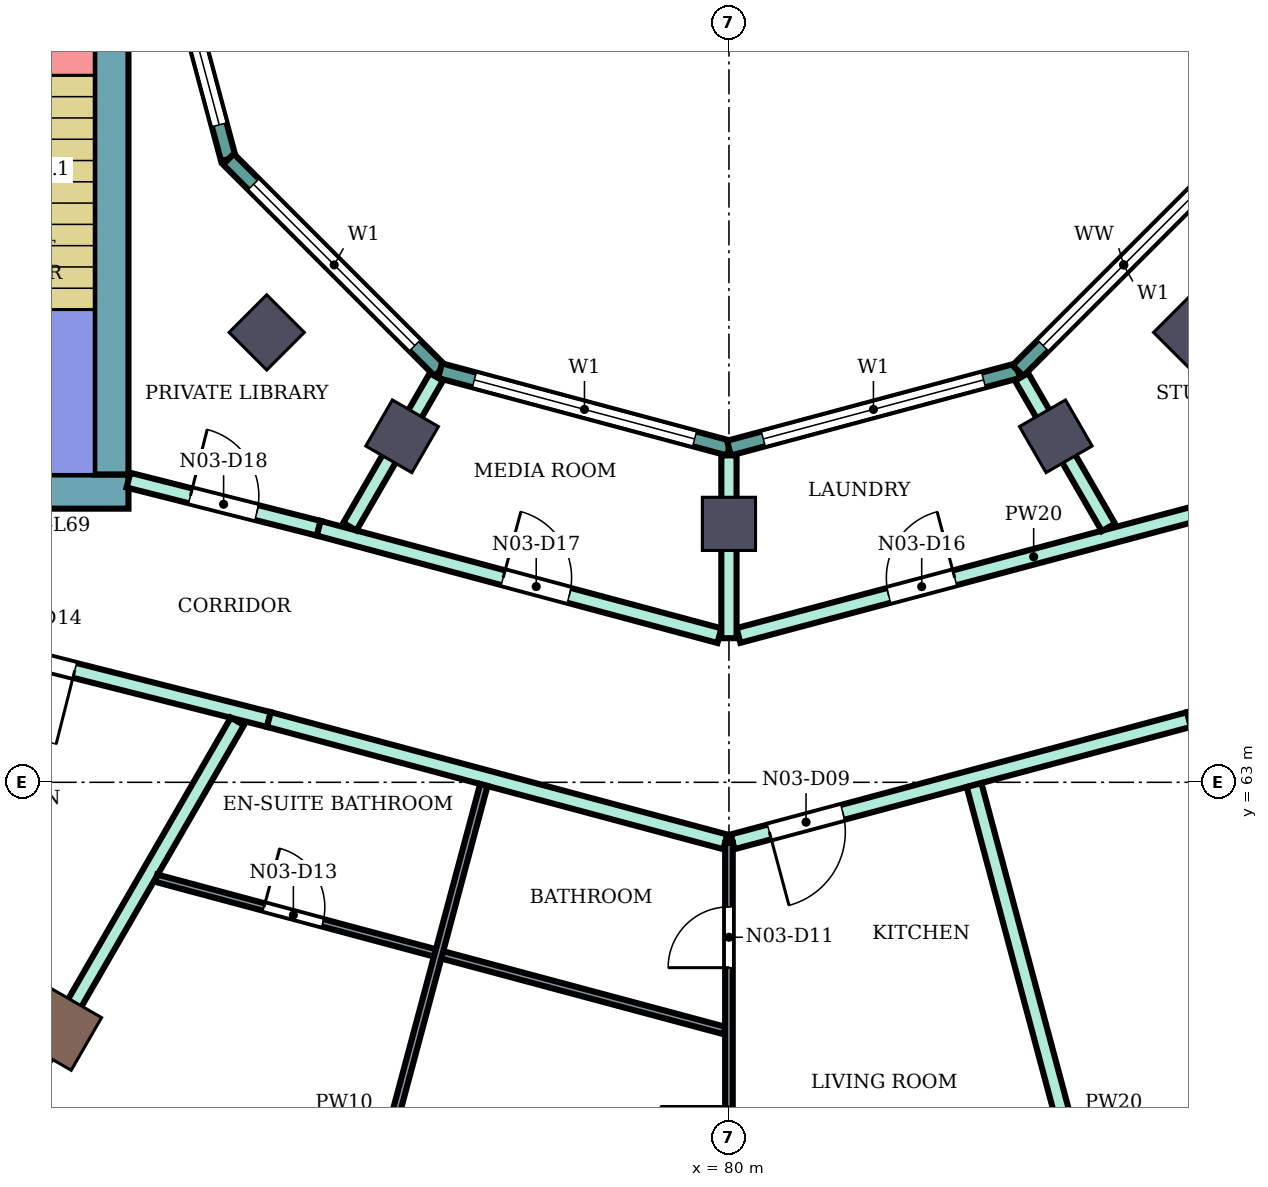
"""IFC4 building model, lengths in metres.
Left out: names, types, materials, properties, quantities, classifications, styles, units other than length and angle.
Written with IfcOpenShell. Run it as: python <this file> out.ifc"""

import sys

from ifc_helpers import new_model, si_unit, direction, frame, frame_2d, origin, origin_2d, place, context, subcontext, project, spatial, rectangle, extrude, element, fill, save


model = new_model("IFC4")
c1 = context("Model", 3, precision=1e-05, world=origin(), true_north=direction((0.0, 1.0)))
c2 = subcontext(c1, "Body", "Model", "MODEL_VIEW")
j1 = project(units=[si_unit("LENGTHUNIT", "METRE"), si_unit("PLANEANGLEUNIT", "RADIAN")], contexts=[c1])
p1 = place(None, origin())
s1 = spatial("IfcSite", under=j1, at=p1, CompositionType="ELEMENT")
p2 = place(p1, origin())
s2 = spatial("IfcBuilding", under=s1, at=p2, CompositionType="ELEMENT")
p3 = place(p2, frame((0.0, 0.0, 300.9)))
s3 = spatial("IfcBuildingStorey", under=s2, at=p3, CompositionType="ELEMENT", Elevation=300.9)
p4 = place(p3, frame((71.2, 59.758, 0.0), z_axis=(0.0, 0.0, 1.0), x_axis=(-0.5, -0.866025403784, 0.0)))
e1 = element("IfcColumn", 1, at=p4, inside=s3, PredefinedType="COLUMN", context=c2, shape_type="SweptSolid", body=[
    extrude(rectangle(XDim=0.8, YDim=0.8, at=origin_2d()), origin(), (0.0, 0.0, 1.0), 4.2),
])
for number, where, z_axis, x_axis in (
    (2, (73.919, 68.919, 0.0), (0.0, 0.0, 1.0), (-0.707, -0.707, 0.0)),
    (3, (75.7, 67.552, 0.0), (0.0, 0.0, 1.0), (-0.5, -0.866, 0.0)),
    (4, (80.0, 66.4, 0.0), (0.0, 0.0, 1.0), (0.0, -1.0, 0.0)),
    (5, (84.3, 67.552, 0.0), (0.0, 0.0, 1.0), (0.5, -0.866, 0.0)),
    (6, (86.081, 68.919, 0.0), (0.0, 0.0, 1.0), (0.707, -0.707, 0.0)),
):
    element("IfcColumn", number, at=place(p3, frame(where, z_axis=z_axis, x_axis=x_axis)), inside=s3, PredefinedType="COLUMN", context=c2, shape_type="SweptSolid", body=[
        extrude(rectangle(XDim=0.7, YDim=0.7, at=origin_2d()), origin(), (0.0, 0.0, 1.0), 4.2),
    ])
p5 = place(p3, frame((72.1, 66.825, 0.0), z_axis=(0.0, 0.0, 1.0), x_axis=(-1.0, 0.0, 0.0)))
e7 = element("IfcWall", 7, at=p5, inside=s3, PredefinedType="SHEAR", context=c2, shape_type="SweptSolid", body=[
    extrude(rectangle(XDim=12.0, YDim=0.45, at=frame_2d((6.0, 0.0))), origin(), (0.0, 0.0, 1.0), 3.88),
])
p6 = place(p5, frame((4.2, 0.0, 0.0)))
e8 = element("IfcOpeningElement", 8, at=p6, cuts=e7, PredefinedType="OPENING", context=c2, shape_type="SweptSolid", body=[
    extrude(rectangle(XDim=2.4, YDim=2.4, at=frame_2d((1.2, 1.2))), frame((0.0, 0.235, 0.0), z_axis=(0.0, -1.0, 0.0), x_axis=(1.0, 0.0, 0.0)), (0.0, 0.0, 1.0), 0.47),
])
p7 = place(p3, frame((71.875, 75.0, 0.0), z_axis=(0.0, 0.0, 1.0), x_axis=(0.0, -1.0, 0.0)))
e9 = element("IfcWall", 9, at=p7, inside=s3, PredefinedType="SHEAR", context=c2, shape_type="SweptSolid", body=[
    extrude(rectangle(XDim=7.95, YDim=0.45, at=frame_2d((3.975, 0.0))), origin(), (0.0, 0.0, 1.0), 3.88),
])
p8 = place(p3, frame((72.396, 75.0, 0.0), z_axis=(0.0, 0.0, 1.0), x_axis=(0.258789828301, -0.965933654434, 0.0)))
e10 = element("IfcWall", 10, at=p8, inside=s3, PredefinedType="NOTDEFINED", context=c2, shape_type="SweptSolid", body=[
    extrude(rectangle(XDim=3.936, YDim=0.2, at=frame_2d((1.968, 0.0))), origin(), (0.0, 0.0, 1.0), 4.2),
])
p9 = place(p8, frame((0.468, 0.0, 0.9)))
e11 = element("IfcOpeningElement", 11, at=p9, cuts=e10, PredefinedType="OPENING", context=c2, shape_type="SweptSolid", body=[
    extrude(rectangle(XDim=3.0, YDim=2.3, at=frame_2d((1.5, 1.15))), frame((0.0, 0.11, 0.0), z_axis=(0.0, -1.0, 0.0), x_axis=(1.0, 0.0, 0.0)), (0.0, 0.0, 1.0), 0.22),
])
p10 = place(p3, frame((73.415, 71.198, 0.0), z_axis=(0.0, 0.0, 1.0), x_axis=(0.707106781187, -0.707106781187, 0.0)))
e12 = element("IfcWall", 12, at=p10, inside=s3, PredefinedType="NOTDEFINED", context=c2, shape_type="SweptSolid", body=[
    extrude(rectangle(XDim=3.936, YDim=0.2, at=frame_2d((1.968, 0.0))), origin(), (0.0, 0.0, 1.0), 4.2),
])
p11 = place(p10, frame((0.468, 0.0, 0.9)))
e13 = element("IfcOpeningElement", 13, at=p11, cuts=e12, PredefinedType="OPENING", context=c2, shape_type="SweptSolid", body=[
    extrude(rectangle(XDim=3.0, YDim=2.3, at=frame_2d((1.5, 1.15))), frame((0.0, 0.11, 0.0), z_axis=(0.0, -1.0, 0.0), x_axis=(1.0, 0.0, 0.0)), (0.0, 0.0, 1.0), 0.22),
])
p12 = place(p3, frame((76.198, 68.415, 0.0), z_axis=(0.0, 0.0, 1.0), x_axis=(0.965933654434, -0.258789828301, 0.0)))
e14 = element("IfcWall", 14, at=p12, inside=s3, PredefinedType="NOTDEFINED", context=c2, shape_type="SweptSolid", body=[
    extrude(rectangle(XDim=3.936, YDim=0.2, at=frame_2d((1.968, 0.0))), origin(), (0.0, 0.0, 1.0), 4.2),
])
p13 = place(p12, frame((0.468, 0.0, 0.9)))
e15 = element("IfcOpeningElement", 15, at=p13, cuts=e14, PredefinedType="OPENING", context=c2, shape_type="SweptSolid", body=[
    extrude(rectangle(XDim=3.0, YDim=2.3, at=frame_2d((1.5, 1.15))), frame((0.0, 0.11, 0.0), z_axis=(0.0, -1.0, 0.0), x_axis=(1.0, 0.0, 0.0)), (0.0, 0.0, 1.0), 0.22),
])
p14 = place(p3, frame((80.0, 67.396, 0.0), z_axis=(0.0, 0.0, 1.0), x_axis=(0.965933654434, 0.258789828301, 0.0)))
e16 = element("IfcWall", 16, at=p14, inside=s3, PredefinedType="NOTDEFINED", context=c2, shape_type="SweptSolid", body=[
    extrude(rectangle(XDim=3.936, YDim=0.2, at=frame_2d((1.968, 0.0))), origin(), (0.0, 0.0, 1.0), 4.2),
])
p15 = place(p14, frame((0.468, 0.0, 0.9)))
e17 = element("IfcOpeningElement", 17, at=p15, cuts=e16, PredefinedType="OPENING", context=c2, shape_type="SweptSolid", body=[
    extrude(rectangle(XDim=3.0, YDim=2.3, at=frame_2d((1.5, 1.15))), frame((0.0, 0.11, 0.0), z_axis=(0.0, -1.0, 0.0), x_axis=(1.0, 0.0, 0.0)), (0.0, 0.0, 1.0), 0.22),
])
p16 = place(p3, frame((83.802, 68.415, 0.0), z_axis=(0.0, 0.0, 1.0), x_axis=(0.707106781187, 0.707106781187, 0.0)))
e18 = element("IfcWall", 18, at=p16, inside=s3, PredefinedType="NOTDEFINED", context=c2, shape_type="SweptSolid", body=[
    extrude(rectangle(XDim=3.936, YDim=0.2, at=frame_2d((1.968, 0.0))), origin(), (0.0, 0.0, 1.0), 4.2),
])
p17 = place(p16, frame((0.468, 0.0, 0.9)))
e19 = element("IfcOpeningElement", 19, at=p17, cuts=e18, PredefinedType="OPENING", context=c2, shape_type="SweptSolid", body=[
    extrude(rectangle(XDim=3.0, YDim=2.3, at=frame_2d((1.5, 1.15))), frame((0.0, 0.11, 0.0), z_axis=(0.0, -1.0, 0.0), x_axis=(1.0, 0.0, 0.0)), (0.0, 0.0, 1.0), 0.22),
])
p18 = place(p3, frame((68.201, 65.28, 0.0), z_axis=(0.0, 0.0, 1.0), x_axis=(0.969421088032, -0.245403247897, 0.0)))
e20 = element("IfcWall", 20, at=p18, inside=s3, PredefinedType="PARTITIONING", context=c2, shape_type="SweptSolid", body=[
    extrude(rectangle(XDim=5.927, YDim=0.2, at=frame_2d((2.964, 0.0))), origin(), (0.0, 0.0, 1.0), 3.75),
])
p19 = place(p18, frame((2.293, 0.0, 0.0)))
e21 = element("IfcOpeningElement", 21, at=p19, cuts=e20, PredefinedType="OPENING", context=c2, shape_type="SweptSolid", body=[
    extrude(rectangle(XDim=1.0, YDim=2.1, at=frame_2d((0.5, 1.05))), frame((0.0, 0.11, 0.0), z_axis=(0.0, -1.0, 0.0), x_axis=(1.0, 0.0, 0.0)), (0.0, 0.0, 1.0), 0.22),
])
p20 = place(p3, frame((68.849, 55.692, 0.0), z_axis=(0.0, 0.0, 1.0), x_axis=(0.50011732958, 0.865957652922, 0.0)))
e22 = element("IfcWall", 22, at=p20, inside=s3, PredefinedType="PARTITIONING", context=c2, shape_type="SweptSolid", body=[
    extrude(rectangle(XDim=9.365, YDim=0.2, at=frame_2d((4.683, 0.0))), origin(), (0.0, 0.0, 1.0), 3.75),
])
p21 = place(p3, frame((72.1, 66.975, 0.0), z_axis=(0.0, 0.0, 1.0), x_axis=(0.969471314457, -0.245204752086, 0.0)))
e23 = element("IfcWall", 23, at=p21, inside=s3, PredefinedType="PARTITIONING", context=c2, shape_type="SweptSolid", body=[
    extrude(rectangle(XDim=2.582, YDim=0.2, at=frame_2d((1.291, 0.0))), origin(), (0.0, 0.0, 1.0), 3.75),
])
p22 = place(p21, frame((0.841, 0.0, 0.0)))
e24 = element("IfcOpeningElement", 24, at=p22, cuts=e23, PredefinedType="OPENING", context=c2, shape_type="SweptSolid", body=[
    extrude(rectangle(XDim=0.9, YDim=2.1, at=frame_2d((0.45, 1.05))), frame((0.0, 0.11, 0.0), z_axis=(0.0, -1.0, 0.0), x_axis=(1.0, 0.0, 0.0)), (0.0, 0.0, 1.0), 0.22),
])
p23 = place(p3, frame((73.947, 63.826, 0.0), z_axis=(0.0, 0.0, 1.0), x_axis=(0.965908253407, -0.258884619088, 0.0)))
e25 = element("IfcWall", 25, at=p23, inside=s3, PredefinedType="PARTITIONING", context=c2, shape_type="SweptSolid", body=[
    extrude(rectangle(XDim=6.217, YDim=0.2, at=frame_2d((3.108, 0.0))), origin(), (0.0, 0.0, 1.0), 3.75),
])
p24 = place(p3, frame((74.603, 66.342, 0.0), z_axis=(0.0, 0.0, 1.0), x_axis=(0.965920893652, -0.258837453254, 0.0)))
e26 = element("IfcWall", 26, at=p24, inside=s3, PredefinedType="PARTITIONING", context=c2, shape_type="SweptSolid", body=[
    extrude(rectangle(XDim=5.458, YDim=0.2, at=frame_2d((2.729, 0.0))), origin(), (0.0, 0.0, 1.0), 3.75),
])
p25 = place(p24, frame((2.512, 0.0, 0.0)))
e27 = element("IfcOpeningElement", 27, at=p25, cuts=e26, PredefinedType="OPENING", context=c2, shape_type="SweptSolid", body=[
    extrude(rectangle(XDim=0.9, YDim=2.1, at=frame_2d((0.45, 1.05))), frame((0.0, 0.11, 0.0), z_axis=(0.0, -1.0, 0.0), x_axis=(1.0, 0.0, 0.0)), (0.0, 0.0, 1.0), 0.22),
])
p26 = place(p3, frame((75.012, 66.363, 0.0), z_axis=(0.0, 0.0, 1.0), x_axis=(0.500097042406, 0.865969369075, 0.0)))
e28 = element("IfcWall", 28, at=p26, inside=s3, PredefinedType="PARTITIONING", context=c2, shape_type="SweptSolid", body=[
    extrude(rectangle(XDim=2.275, YDim=0.2, at=frame_2d((1.138, 0.0))), origin(), (0.0, 0.0, 1.0), 3.75),
])
p27 = place(p3, frame((80.125, 64.932, 0.0), z_axis=(0.0, 0.0, 1.0), x_axis=(0.966236955806, 0.257655089674, 0.0)))
e29 = element("IfcWall", 29, at=p27, inside=s3, PredefinedType="PARTITIONING", context=c2, shape_type="SweptSolid", body=[
    extrude(rectangle(XDim=8.039, YDim=0.2, at=frame_2d((4.02, 0.0))), origin(), (0.0, 0.0, 1.0), 3.75),
])
p28 = place(p27, frame((6.298, 0.0, 0.0)))
e30 = element("IfcOpeningElement", 30, at=p28, cuts=e29, PredefinedType="OPENING", context=c2, shape_type="SweptSolid", body=[
    extrude(rectangle(XDim=0.9, YDim=2.1, at=frame_2d((0.45, 1.05))), frame((0.0, 0.11, 0.0), z_axis=(0.0, -1.0, 0.0), x_axis=(1.0, 0.0, 0.0)), (0.0, 0.0, 1.0), 0.22),
])
p29 = place(p27, frame((2.045, 0.0, 0.0)))
e31 = element("IfcOpeningElement", 31, at=p29, cuts=e29, PredefinedType="OPENING", context=c2, shape_type="SweptSolid", body=[
    extrude(rectangle(XDim=0.9, YDim=2.1, at=frame_2d((0.45, 1.05))), frame((0.0, 0.11, 0.0), z_axis=(0.0, -1.0, 0.0), x_axis=(1.0, 0.0, 0.0)), (0.0, 0.0, 1.0), 0.22),
])
p30 = place(p3, frame((80.048, 62.217, 0.0), z_axis=(0.0, 0.0, 1.0), x_axis=(0.965937709386, 0.258774692708, 0.0)))
e32 = element("IfcWall", 32, at=p30, inside=s3, PredefinedType="PARTITIONING", context=c2, shape_type="SweptSolid", body=[
    extrude(rectangle(XDim=6.216, YDim=0.2, at=frame_2d((3.108, 0.0))), origin(), (0.0, 0.0, 1.0), 3.75),
])
p31 = place(p30, frame((0.5, 0.0, 0.0)))
e33 = element("IfcOpeningElement", 33, at=p31, cuts=e32, PredefinedType="OPENING", context=c2, shape_type="SweptSolid", body=[
    extrude(rectangle(XDim=1.0, YDim=2.1, at=frame_2d((0.5, 1.05))), frame((0.0, 0.11, 0.0), z_axis=(0.0, -1.0, 0.0), x_axis=(1.0, 0.0, 0.0)), (0.0, 0.0, 1.0), 0.22),
])
p32 = place(p3, frame((80.0, 64.896, 0.0), z_axis=(0.0, 0.0, 1.0), x_axis=(0.0, 1.0, 0.0)))
e34 = element("IfcWall", 34, at=p32, inside=s3, PredefinedType="PARTITIONING", context=c2, shape_type="SweptSolid", body=[
    extrude(rectangle(XDim=2.405, YDim=0.2, at=frame_2d((1.203, 0.0))), origin(), (0.0, 0.0, 1.0), 3.75),
])
p33 = place(p3, frame((83.225, 62.963, 0.0), z_axis=(0.0, 0.0, 1.0), x_axis=(0.258782398991, -0.96593564484, 0.0)))
e35 = element("IfcWall", 35, at=p33, inside=s3, PredefinedType="PARTITIONING", context=c2, shape_type="SweptSolid", body=[
    extrude(rectangle(XDim=9.837, YDim=0.2, at=frame_2d((4.918, 0.0))), origin(), (0.0, 0.0, 1.0), 3.75),
])
p34 = place(p3, frame((83.85, 68.333, 0.0), z_axis=(0.0, 0.0, 1.0), x_axis=(0.500080019051, -0.865979199835, 0.0)))
e36 = element("IfcWall", 36, at=p34, inside=s3, PredefinedType="PARTITIONING", context=c2, shape_type="SweptSolid", body=[
    extrude(rectangle(XDim=2.285, YDim=0.2, at=frame_2d((1.143, 0.0))), origin(), (0.0, 0.0, 1.0), 3.75),
])
p35 = place(p3, frame((86.053, 63.826, 0.0), z_axis=(0.0, 0.0, 1.0), x_axis=(0.969480070232, 0.245170131586, 0.0)))
e37 = element("IfcWall", 37, at=p35, inside=s3, PredefinedType="PARTITIONING", context=c2, shape_type="SweptSolid", body=[
    extrude(rectangle(XDim=5.907, YDim=0.2, at=frame_2d((2.954, 0.0))), origin(), (0.0, 0.0, 1.0), 3.75),
])
p36 = place(p35, frame((2.464, 0.0, 0.0)))
e38 = element("IfcOpeningElement", 38, at=p36, cuts=e37, PredefinedType="OPENING", context=c2, shape_type="SweptSolid", body=[
    extrude(rectangle(XDim=1.0, YDim=2.1, at=frame_2d((0.5, 1.05))), frame((0.0, 0.11, 0.0), z_axis=(0.0, -1.0, 0.0), x_axis=(1.0, 0.0, 0.0)), (0.0, 0.0, 1.0), 0.22),
])
p37 = place(p3, frame((72.465, 61.739, 0.0), z_axis=(0.0, 0.0, 1.0), x_axis=(0.965899611634, -0.258916859715, 0.0)))
e39 = element("IfcWall", 39, at=p37, inside=s3, PredefinedType="PARTITIONING", context=c2, shape_type="SweptSolid", body=[
    extrude(rectangle(XDim=7.74, YDim=0.1, at=frame_2d((3.87, 0.0))), origin(), (0.0, 0.0, 1.0), 3.75),
])
p38 = place(p37, frame((1.468, 0.0, 0.0)))
e40 = element("IfcOpeningElement", 40, at=p38, cuts=e39, PredefinedType="OPENING", context=c2, shape_type="SweptSolid", body=[
    extrude(rectangle(XDim=0.8, YDim=2.1, at=frame_2d((0.4, 1.05))), frame((0.0, 0.06, 0.0), z_axis=(0.0, -1.0, 0.0), x_axis=(1.0, 0.0, 0.0)), (0.0, 0.0, 1.0), 0.12),
])
p39 = place(p3, frame((74.229, 53.462, 0.0), z_axis=(0.0, 0.0, 1.0), x_axis=(0.258810097991, 0.965928223616, 0.0)))
e41 = element("IfcWall", 41, at=p39, inside=s3, PredefinedType="PARTITIONING", context=c2, shape_type="SweptSolid", body=[
    extrude(rectangle(XDim=9.838, YDim=0.1, at=frame_2d((4.919, 0.0))), origin(), (0.0, 0.0, 1.0), 3.75),
])
p40 = place(p39, frame((3.344, 0.0, 0.0)))
e42 = element("IfcOpeningElement", 42, at=p40, cuts=e41, PredefinedType="OPENING", context=c2, shape_type="SweptSolid", body=[
    extrude(rectangle(XDim=0.9, YDim=2.1, at=frame_2d((0.45, 1.05))), frame((0.0, 0.06, 0.0), z_axis=(0.0, -1.0, 0.0), x_axis=(1.0, 0.0, 0.0)), (0.0, 0.0, 1.0), 0.12),
])
p41 = place(p3, frame((80.0, 55.3, 0.0), z_axis=(0.0, 0.0, 1.0), x_axis=(0.0, 1.0, 0.0)))
e43 = element("IfcWall", 43, at=p41, inside=s3, PredefinedType="PARTITIONING", context=c2, shape_type="SweptSolid", body=[
    extrude(rectangle(XDim=6.904, YDim=0.1, at=frame_2d((3.452, 0.0))), origin(), (0.0, 0.0, 1.0), 3.75),
])
p42 = place(p41, frame((2.534, 0.0, 0.0)))
e44 = element("IfcOpeningElement", 44, at=p42, cuts=e43, PredefinedType="OPENING", context=c2, shape_type="SweptSolid", body=[
    extrude(rectangle(XDim=0.9, YDim=2.1, at=frame_2d((0.45, 1.05))), frame((0.0, 0.06, 0.0), z_axis=(0.0, -1.0, 0.0), x_axis=(1.0, 0.0, 0.0)), (0.0, 0.0, 1.0), 0.12),
])
p43 = place(p41, frame((5.261, 0.0, 0.0)))
e45 = element("IfcOpeningElement", 45, at=p43, cuts=e43, PredefinedType="OPENING", context=c2, shape_type="SweptSolid", body=[
    extrude(rectangle(XDim=0.8, YDim=2.1, at=frame_2d((0.4, 1.05))), frame((0.0, 0.06, 0.0), z_axis=(0.0, -1.0, 0.0), x_axis=(1.0, 0.0, 0.0)), (0.0, 0.0, 1.0), 0.12),
])
p44 = place(p9, origin())
e46 = element("IfcWindow", 46, at=p44, inside=s3, PartitioningType="SINGLE_PANEL", PredefinedType="WINDOW", context=c2, shape_type="SweptSolid", body=[
    extrude(rectangle(XDim=3.0, YDim=2.3, at=frame_2d((1.5, 1.15))), frame((0.0, 0.03, 0.0), z_axis=(0.0, -1.0, 0.0), x_axis=(1.0, 0.0, 0.0)), (0.0, 0.0, 1.0), 0.06),
])
fill(e11, e46)
p45 = place(p11, origin())
e47 = element("IfcWindow", 47, at=p45, inside=s3, PartitioningType="SINGLE_PANEL", PredefinedType="WINDOW", context=c2, shape_type="SweptSolid", body=[
    extrude(rectangle(XDim=3.0, YDim=2.3, at=frame_2d((1.5, 1.15))), frame((0.0, 0.03, 0.0), z_axis=(0.0, -1.0, 0.0), x_axis=(1.0, 0.0, 0.0)), (0.0, 0.0, 1.0), 0.06),
])
fill(e13, e47)
p46 = place(p13, origin())
e48 = element("IfcWindow", 48, at=p46, inside=s3, PartitioningType="SINGLE_PANEL", PredefinedType="WINDOW", context=c2, shape_type="SweptSolid", body=[
    extrude(rectangle(XDim=3.0, YDim=2.3, at=frame_2d((1.5, 1.15))), frame((0.0, 0.03, 0.0), z_axis=(0.0, -1.0, 0.0), x_axis=(1.0, 0.0, 0.0)), (0.0, 0.0, 1.0), 0.06),
])
fill(e15, e48)
p47 = place(p15, origin())
e49 = element("IfcWindow", 49, at=p47, inside=s3, PartitioningType="SINGLE_PANEL", PredefinedType="WINDOW", context=c2, shape_type="SweptSolid", body=[
    extrude(rectangle(XDim=3.0, YDim=2.3, at=frame_2d((1.5, 1.15))), frame((0.0, 0.03, 0.0), z_axis=(0.0, -1.0, 0.0), x_axis=(1.0, 0.0, 0.0)), (0.0, 0.0, 1.0), 0.06),
])
fill(e17, e49)
p48 = place(p17, origin())
e50 = element("IfcWindow", 50, at=p48, inside=s3, PartitioningType="SINGLE_PANEL", PredefinedType="WINDOW", context=c2, shape_type="SweptSolid", body=[
    extrude(rectangle(XDim=3.0, YDim=2.3, at=frame_2d((1.5, 1.15))), frame((0.0, 0.03, 0.0), z_axis=(0.0, -1.0, 0.0), x_axis=(1.0, 0.0, 0.0)), (0.0, 0.0, 1.0), 0.06),
])
fill(e19, e50)
p49 = place(p31, frame((1.0, 0.0, 0.0), z_axis=(0.0, 0.0, 1.0), x_axis=(-1.0, 0.0, 0.0)))
e51 = element("IfcDoor", 51, at=p49, inside=s3, OperationType="SINGLE_SWING_RIGHT", PredefinedType="DOOR", context=c2, shape_type="SweptSolid", body=[
    extrude(rectangle(XDim=1.0, YDim=2.1, at=frame_2d((0.5, 1.05))), frame((0.0, 0.025, 0.0), z_axis=(0.0, -1.0, 0.0), x_axis=(1.0, 0.0, 0.0)), (0.0, 0.0, 1.0), 0.05),
])
fill(e33, e51)
p50 = place(p42, origin())
e52 = element("IfcDoor", 52, at=p50, inside=s3, OperationType="SINGLE_SWING_RIGHT", PredefinedType="DOOR", context=c2, shape_type="SweptSolid", body=[
    extrude(rectangle(XDim=0.9, YDim=2.1, at=frame_2d((0.45, 1.05))), frame((0.0, 0.025, 0.0), z_axis=(0.0, -1.0, 0.0), x_axis=(1.0, 0.0, 0.0)), (0.0, 0.0, 1.0), 0.05),
])
fill(e44, e52)
p51 = place(p43, origin())
e53 = element("IfcDoor", 53, at=p51, inside=s3, OperationType="SINGLE_SWING_LEFT", PredefinedType="DOOR", context=c2, shape_type="SweptSolid", body=[
    extrude(rectangle(XDim=0.8, YDim=2.1, at=frame_2d((0.4, 1.05))), frame((0.0, 0.025, 0.0), z_axis=(0.0, -1.0, 0.0), x_axis=(1.0, 0.0, 0.0)), (0.0, 0.0, 1.0), 0.05),
])
fill(e45, e53)
p52 = place(p38, origin())
e54 = element("IfcDoor", 54, at=p52, inside=s3, OperationType="SINGLE_SWING_LEFT", PredefinedType="DOOR", context=c2, shape_type="SweptSolid", body=[
    extrude(rectangle(XDim=0.8, YDim=2.1, at=frame_2d((0.4, 1.05))), frame((0.0, 0.025, 0.0), z_axis=(0.0, -1.0, 0.0), x_axis=(1.0, 0.0, 0.0)), (0.0, 0.0, 1.0), 0.05),
])
fill(e40, e54)
p53 = place(p19, frame((1.0, 0.0, 0.0), z_axis=(0.0, 0.0, 1.0), x_axis=(-1.0, 0.0, 0.0)))
e55 = element("IfcDoor", 55, at=p53, inside=s3, OperationType="SINGLE_SWING_LEFT", PredefinedType="DOOR", context=c2, shape_type="SweptSolid", body=[
    extrude(rectangle(XDim=1.0, YDim=2.1, at=frame_2d((0.5, 1.05))), frame((0.0, 0.025, 0.0), z_axis=(0.0, -1.0, 0.0), x_axis=(1.0, 0.0, 0.0)), (0.0, 0.0, 1.0), 0.05),
])
fill(e21, e55)
p54 = place(p29, origin())
e56 = element("IfcDoor", 56, at=p54, inside=s3, OperationType="SINGLE_SWING_RIGHT", PredefinedType="DOOR", context=c2, shape_type="SweptSolid", body=[
    extrude(rectangle(XDim=0.9, YDim=2.1, at=frame_2d((0.45, 1.05))), frame((0.0, 0.025, 0.0), z_axis=(0.0, -1.0, 0.0), x_axis=(1.0, 0.0, 0.0)), (0.0, 0.0, 1.0), 0.05),
])
fill(e31, e56)
p55 = place(p25, origin())
e57 = element("IfcDoor", 57, at=p55, inside=s3, OperationType="SINGLE_SWING_LEFT", PredefinedType="DOOR", context=c2, shape_type="SweptSolid", body=[
    extrude(rectangle(XDim=0.9, YDim=2.1, at=frame_2d((0.45, 1.05))), frame((0.0, 0.025, 0.0), z_axis=(0.0, -1.0, 0.0), x_axis=(1.0, 0.0, 0.0)), (0.0, 0.0, 1.0), 0.05),
])
fill(e27, e57)
p56 = place(p22, origin())
e58 = element("IfcDoor", 58, at=p56, inside=s3, OperationType="SINGLE_SWING_LEFT", PredefinedType="DOOR", context=c2, shape_type="SweptSolid", body=[
    extrude(rectangle(XDim=0.9, YDim=2.1, at=frame_2d((0.45, 1.05))), frame((0.0, 0.025, 0.0), z_axis=(0.0, -1.0, 0.0), x_axis=(1.0, 0.0, 0.0)), (0.0, 0.0, 1.0), 0.05),
])
fill(e24, e58)
save(model, sys.argv[1])
